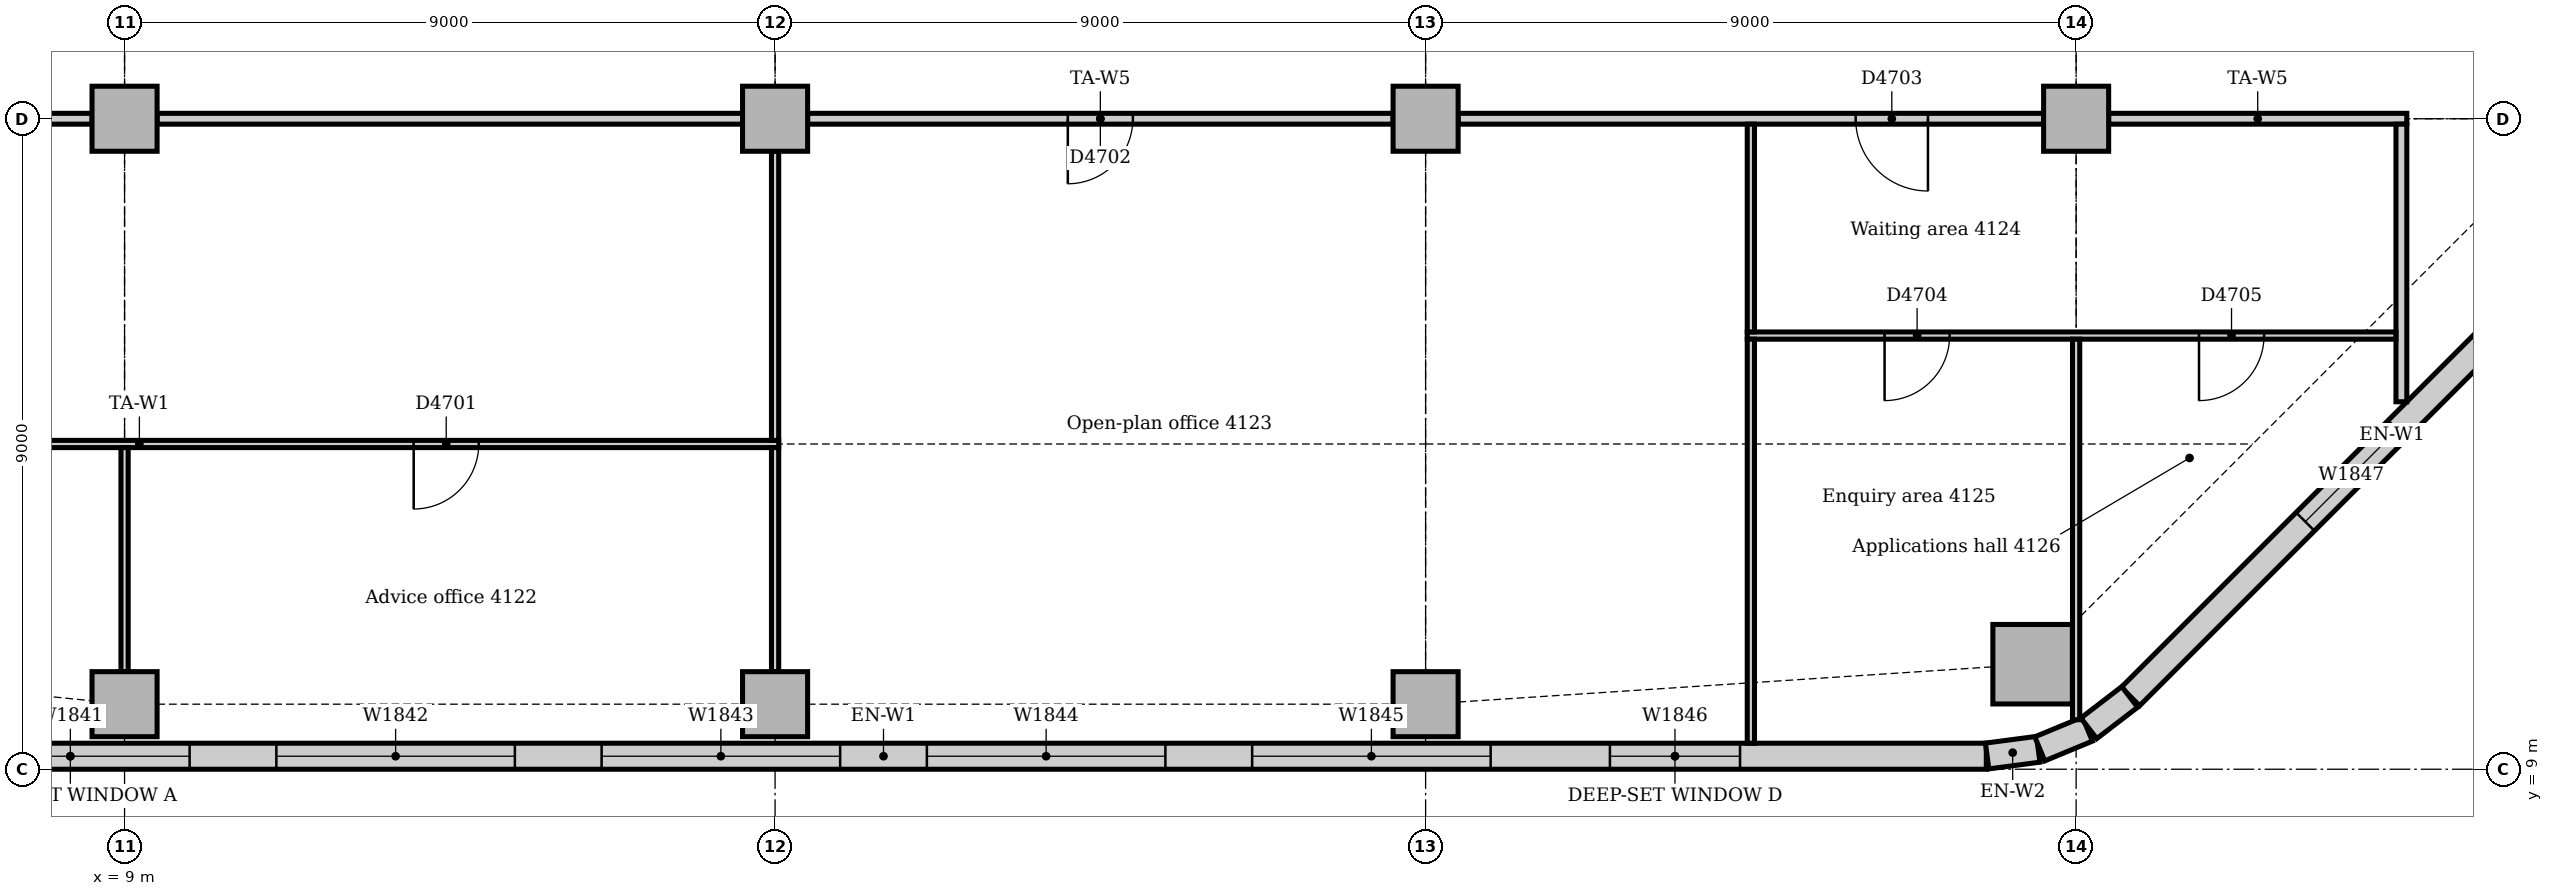
"""IFC4 building model, lengths in metres.
Left out: names, types, materials, properties, quantities, classifications, styles, units other than length and angle.
Written with IfcOpenShell. Run it as: python <this file> out.ifc"""

import sys

from ifc_helpers import new_model, si_unit, direction, frame, frame_2d, origin, origin_2d, place, context, subcontext, project, spatial, rectangle, extrude, element, fill, save


model = new_model("IFC4")
c1 = context("Model", 3, precision=1e-05, world=origin(), true_north=direction((0.0, 1.0)))
c2 = subcontext(c1, "Body", "Model", "MODEL_VIEW")
j1 = project(units=[si_unit("LENGTHUNIT", "METRE"), si_unit("PLANEANGLEUNIT", "RADIAN")], contexts=[c1])
p1 = place(None, origin())
s1 = spatial("IfcSite", under=j1, at=p1, CompositionType="ELEMENT")
p2 = place(p1, origin())
s2 = spatial("IfcBuilding", under=s1, at=p2, CompositionType="ELEMENT")
p3 = place(p2, frame((0.0, 0.0, 173.0)))
s3 = spatial("IfcBuildingStorey", under=s2, at=p3, CompositionType="ELEMENT", Elevation=173.0)
p4 = place(p3, frame((35.398, 10.453, 0.0), z_axis=(0.0, 0.0, 1.0), x_axis=(1.0, 0.0, 0.0)))
e1 = element("IfcColumn", 1, at=p4, inside=s3, PredefinedType="COLUMN", context=c2, shape_type="SweptSolid", body=[
    extrude(rectangle(XDim=1.1, YDim=1.1, at=origin_2d()), origin(), (0.0, 0.0, 1.0), 3.85),
])
for number, where, z_axis, x_axis in (
    (2, (9.0, 9.9, 0.0), (0.0, 0.0, 1.0), (1.0, 0.0, 0.0)),
    (3, (18.0, 9.9, 0.0), (0.0, 0.0, 1.0), (1.0, 0.0, 0.0)),
    (4, (27.0, 9.9, 0.0), (0.0, 0.0, 1.0), (1.0, 0.0, 0.0)),
    (5, (9.0, 18.0, 0.0), (0.0, 0.0, 1.0), (1.0, 0.0, 0.0)),
    (6, (18.0, 18.0, 0.0), (0.0, 0.0, 1.0), (1.0, 0.0, 0.0)),
    (7, (27.0, 18.0, 0.0), (0.0, 0.0, 1.0), (1.0, 0.0, 0.0)),
    (8, (36.0, 18.0, 0.0), (0.0, 0.0, 1.0), (1.0, 0.0, 0.0)),
):
    element("IfcColumn", number, at=place(p3, frame(where, z_axis=z_axis, x_axis=x_axis)), inside=s3, PredefinedType="COLUMN", context=c2, shape_type="SweptSolid", body=[
        extrude(rectangle(XDim=0.9, YDim=0.9, at=origin_2d()), origin(), (0.0, 0.0, 1.0), 3.85),
    ])
p5 = place(p3, frame((4.243, 9.18, 0.0), z_axis=(0.0, 0.0, 1.0), x_axis=(1.0, 0.0, 0.0)))
e9 = element("IfcWall", 9, at=p5, inside=s3, PredefinedType="STANDARD", context=c2, shape_type="SweptSolid", body=[
    extrude(rectangle(XDim=30.515, YDim=0.36, at=frame_2d((15.257, 0.0))), origin(), (0.0, 0.0, 1.0), 3.85),
])
p6 = place(p5, frame((2.357, 0.0, 0.9)))
e10 = element("IfcOpeningElement", 10, at=p6, cuts=e9, PredefinedType="OPENING", context=c2, shape_type="SweptSolid", body=[
    extrude(rectangle(XDim=3.3, YDim=1.6, at=frame_2d((1.65, 0.8))), frame((0.0, 0.19, 0.0), z_axis=(0.0, -1.0, 0.0), x_axis=(1.0, 0.0, 0.0)), (0.0, 0.0, 1.0), 0.38),
])
p7 = place(p5, frame((6.857, 0.0, 0.9)))
e11 = element("IfcOpeningElement", 11, at=p7, cuts=e9, PredefinedType="OPENING", context=c2, shape_type="SweptSolid", body=[
    extrude(rectangle(XDim=3.3, YDim=1.6, at=frame_2d((1.65, 0.8))), frame((0.0, 0.19, 0.0), z_axis=(0.0, -1.0, 0.0), x_axis=(1.0, 0.0, 0.0)), (0.0, 0.0, 1.0), 0.38),
])
p8 = place(p5, frame((11.357, 0.0, 0.9)))
e12 = element("IfcOpeningElement", 12, at=p8, cuts=e9, PredefinedType="OPENING", context=c2, shape_type="SweptSolid", body=[
    extrude(rectangle(XDim=3.3, YDim=1.6, at=frame_2d((1.65, 0.8))), frame((0.0, 0.19, 0.0), z_axis=(0.0, -1.0, 0.0), x_axis=(1.0, 0.0, 0.0)), (0.0, 0.0, 1.0), 0.38),
])
p9 = place(p5, frame((15.857, 0.0, 0.9)))
e13 = element("IfcOpeningElement", 13, at=p9, cuts=e9, PredefinedType="OPENING", context=c2, shape_type="SweptSolid", body=[
    extrude(rectangle(XDim=3.3, YDim=1.6, at=frame_2d((1.65, 0.8))), frame((0.0, 0.19, 0.0), z_axis=(0.0, -1.0, 0.0), x_axis=(1.0, 0.0, 0.0)), (0.0, 0.0, 1.0), 0.38),
])
p10 = place(p5, frame((20.357, 0.0, 0.9)))
e14 = element("IfcOpeningElement", 14, at=p10, cuts=e9, PredefinedType="OPENING", context=c2, shape_type="SweptSolid", body=[
    extrude(rectangle(XDim=3.3, YDim=1.6, at=frame_2d((1.65, 0.8))), frame((0.0, 0.19, 0.0), z_axis=(0.0, -1.0, 0.0), x_axis=(1.0, 0.0, 0.0)), (0.0, 0.0, 1.0), 0.38),
])
p11 = place(p5, frame((25.307, 0.0, 0.9)))
e15 = element("IfcOpeningElement", 15, at=p11, cuts=e9, PredefinedType="OPENING", context=c2, shape_type="SweptSolid", body=[
    extrude(rectangle(XDim=1.8, YDim=1.6, at=frame_2d((0.9, 0.8))), frame((0.0, 0.19, 0.0), z_axis=(0.0, -1.0, 0.0), x_axis=(1.0, 0.0, 0.0)), (0.0, 0.0, 1.0), 0.38),
])
p12 = place(p3, frame((36.751, 10.006, 0.0), z_axis=(0.0, 0.0, 1.0), x_axis=(0.707106781187, 0.707106781187, 0.0)))
e16 = element("IfcWall", 16, at=p12, inside=s3, PredefinedType="STANDARD", context=c2, shape_type="SweptSolid", body=[
    extrude(rectangle(XDim=10.243, YDim=0.36, at=frame_2d((5.121, 0.0))), origin(), (0.0, 0.0, 1.0), 3.85),
])
p13 = place(p12, frame((3.421, 0.0, 0.9)))
e17 = element("IfcOpeningElement", 17, at=p13, cuts=e16, PredefinedType="OPENING", context=c2, shape_type="SweptSolid", body=[
    extrude(rectangle(XDim=1.8, YDim=1.6, at=frame_2d((0.9, 0.8))), frame((0.0, 0.19, 0.0), z_axis=(0.0, -1.0, 0.0), x_axis=(1.0, 0.0, 0.0)), (0.0, 0.0, 1.0), 0.38),
])
for number, where, z_axis, x_axis in (
    (18, (34.769, 9.183, 0.0), (0.0, 0.0, 1.0), (0.991, 0.131, 0.0)),
    (19, (35.497, 9.282, 0.0), (0.0, 0.0, 1.0), (0.924, 0.383, 0.0)),
):
    element("IfcWall", number, at=place(p3, frame(where, z_axis=z_axis, x_axis=x_axis)), inside=s3, PredefinedType="STANDARD", context=c2, shape_type="SweptSolid", body=[
        extrude(rectangle(XDim=0.713, YDim=0.36, at=frame_2d((0.356, 0.0))), origin(), (0.0, 0.0, 1.0), 3.85),
    ])
p14 = place(p3, frame((36.175, 9.566, 0.0), z_axis=(0.0, 0.0, 1.0), x_axis=(0.793321924995, 0.608802368033, 0.0)))
e20 = element("IfcWall", 20, at=p14, inside=s3, PredefinedType="STANDARD", context=c2, shape_type="SweptSolid", body=[
    extrude(rectangle(XDim=0.713, YDim=0.36, at=frame_2d((0.357, 0.0))), origin(), (0.0, 0.0, 1.0), 3.85),
])
p15 = place(p3, frame((1.35, 18.0, 0.0), z_axis=(0.0, 0.0, 1.0), x_axis=(1.0, 0.0, 0.0)))
e21 = element("IfcWall", 21, at=p15, inside=s3, PredefinedType="PARTITIONING", context=c2, shape_type="SweptSolid", body=[
    extrude(rectangle(XDim=7.2, YDim=0.15, at=frame_2d((3.6, 0.0))), origin(), (0.0, 0.0, 1.0), 3.262),
])
p16 = place(p15, frame((3.1, 0.0, 0.0)))
e22 = element("IfcOpeningElement", 22, at=p16, cuts=e21, PredefinedType="OPENING", context=c2, shape_type="SweptSolid", body=[
    extrude(rectangle(XDim=1.0, YDim=2.1, at=frame_2d((0.5, 1.05))), frame((0.0, 0.085, 0.0), z_axis=(0.0, -1.0, 0.0), x_axis=(1.0, 0.0, 0.0)), (0.0, 0.0, 1.0), 0.17),
])
p17 = place(p3, frame((9.45, 18.0, 0.0), z_axis=(0.0, 0.0, 1.0), x_axis=(1.0, 0.0, 0.0)))
e23 = element("IfcWall", 23, at=p17, inside=s3, PredefinedType="PARTITIONING", context=c2, shape_type="SweptSolid", body=[
    extrude(rectangle(XDim=8.1, YDim=0.15, at=frame_2d((4.05, 0.0))), origin(), (0.0, 0.0, 1.0), 3.262),
])
p18 = place(p3, frame((18.45, 18.0, 0.0), z_axis=(0.0, 0.0, 1.0), x_axis=(1.0, 0.0, 0.0)))
e24 = element("IfcWall", 24, at=p18, inside=s3, PredefinedType="PARTITIONING", context=c2, shape_type="SweptSolid", body=[
    extrude(rectangle(XDim=8.1, YDim=0.15, at=frame_2d((4.05, 0.0))), origin(), (0.0, 0.0, 1.0), 3.262),
])
p19 = place(p18, frame((3.6, 0.0, 0.0)))
e25 = element("IfcOpeningElement", 25, at=p19, cuts=e24, PredefinedType="OPENING", context=c2, shape_type="SweptSolid", body=[
    extrude(rectangle(XDim=0.9, YDim=2.1, at=frame_2d((0.45, 1.05))), frame((0.0, 0.085, 0.0), z_axis=(0.0, -1.0, 0.0), x_axis=(1.0, 0.0, 0.0)), (0.0, 0.0, 1.0), 0.17),
])
p20 = place(p3, frame((27.45, 18.0, 0.0), z_axis=(0.0, 0.0, 1.0), x_axis=(1.0, 0.0, 0.0)))
e26 = element("IfcWall", 26, at=p20, inside=s3, PredefinedType="PARTITIONING", context=c2, shape_type="SweptSolid", body=[
    extrude(rectangle(XDim=8.1, YDim=0.15, at=frame_2d((4.05, 0.0))), origin(), (0.0, 0.0, 1.0), 3.262),
])
p21 = place(p20, frame((5.5, 0.0, 0.0)))
e27 = element("IfcOpeningElement", 27, at=p21, cuts=e26, PredefinedType="OPENING", context=c2, shape_type="SweptSolid", body=[
    extrude(rectangle(XDim=1.0, YDim=2.1, at=frame_2d((0.5, 1.05))), frame((0.0, 0.085, 0.0), z_axis=(0.0, -1.0, 0.0), x_axis=(1.0, 0.0, 0.0)), (0.0, 0.0, 1.0), 0.17),
])
p22 = place(p3, frame((36.45, 18.0, 0.0), z_axis=(0.0, 0.0, 1.0), x_axis=(1.0, 0.0, 0.0)))
e28 = element("IfcWall", 28, at=p22, inside=s3, PredefinedType="PARTITIONING", context=c2, shape_type="SweptSolid", body=[
    extrude(rectangle(XDim=4.125, YDim=0.15, at=frame_2d((2.062, 0.0))), origin(), (0.0, 0.0, 1.0), 3.35),
])
p23 = place(p3, frame((40.5, 14.084, 0.0), z_axis=(0.0, 0.0, 1.0), x_axis=(0.0, 1.0, 0.0)))
e29 = element("IfcWall", 29, at=p23, inside=s3, PredefinedType="PARTITIONING", context=c2, shape_type="SweptSolid", body=[
    extrude(rectangle(XDim=3.841, YDim=0.15, at=frame_2d((1.921, 0.0))), origin(), (0.0, 0.0, 1.0), 3.85),
])
p24 = place(p3, frame((0.36, 13.5, 0.0), z_axis=(0.0, 0.0, 1.0), x_axis=(1.0, 0.0, 0.0)))
e30 = element("IfcWall", 30, at=p24, inside=s3, PredefinedType="PARTITIONING", context=c2, shape_type="SweptSolid", body=[
    extrude(rectangle(XDim=17.69, YDim=0.1, at=frame_2d((8.845, 0.0))), origin(), (0.0, 0.0, 1.0), 3.4),
])
p25 = place(p24, frame((3.95, 0.0, 0.0)))
e31 = element("IfcOpeningElement", 31, at=p25, cuts=e30, PredefinedType="OPENING", context=c2, shape_type="SweptSolid", body=[
    extrude(rectangle(XDim=0.9, YDim=2.1, at=frame_2d((0.45, 1.05))), frame((0.0, 0.06, 0.0), z_axis=(0.0, -1.0, 0.0), x_axis=(1.0, 0.0, 0.0)), (0.0, 0.0, 1.0), 0.12),
])
p26 = place(p24, frame((12.64, 0.0, 0.0)))
e32 = element("IfcOpeningElement", 32, at=p26, cuts=e30, PredefinedType="OPENING", context=c2, shape_type="SweptSolid", body=[
    extrude(rectangle(XDim=0.9, YDim=2.1, at=frame_2d((0.45, 1.05))), frame((0.0, 0.06, 0.0), z_axis=(0.0, -1.0, 0.0), x_axis=(1.0, 0.0, 0.0)), (0.0, 0.0, 1.0), 0.12),
])
p27 = place(p3, frame((31.45, 15.0, 0.0), z_axis=(0.0, 0.0, 1.0), x_axis=(1.0, 0.0, 0.0)))
e33 = element("IfcWall", 33, at=p27, inside=s3, PredefinedType="PARTITIONING", context=c2, shape_type="SweptSolid", body=[
    extrude(rectangle(XDim=8.975, YDim=0.1, at=frame_2d((4.487, 0.0))), origin(), (0.0, 0.0, 1.0), 3.85),
])
p28 = place(p27, frame((1.9, 0.0, 0.0)))
e34 = element("IfcOpeningElement", 34, at=p28, cuts=e33, PredefinedType="OPENING", context=c2, shape_type="SweptSolid", body=[
    extrude(rectangle(XDim=0.9, YDim=2.1, at=frame_2d((0.45, 1.05))), frame((0.0, 0.06, 0.0), z_axis=(0.0, -1.0, 0.0), x_axis=(1.0, 0.0, 0.0)), (0.0, 0.0, 1.0), 0.12),
])
p29 = place(p27, frame((6.25, 0.0, 0.0)))
e35 = element("IfcOpeningElement", 35, at=p29, cuts=e33, PredefinedType="OPENING", context=c2, shape_type="SweptSolid", body=[
    extrude(rectangle(XDim=0.9, YDim=2.1, at=frame_2d((0.45, 1.05))), frame((0.0, 0.06, 0.0), z_axis=(0.0, -1.0, 0.0), x_axis=(1.0, 0.0, 0.0)), (0.0, 0.0, 1.0), 0.12),
])
p30 = place(p3, frame((18.0, 10.35, 0.0), z_axis=(0.0, 0.0, 1.0), x_axis=(0.0, 1.0, 0.0)))
e36 = element("IfcWall", 36, at=p30, inside=s3, PredefinedType="PARTITIONING", context=c2, shape_type="SweptSolid", body=[
    extrude(rectangle(XDim=3.1, YDim=0.1, at=frame_2d((1.55, 0.0))), origin(), (0.0, 0.0, 1.0), 3.362),
])
p31 = place(p3, frame((18.0, 13.55, 0.0), z_axis=(0.0, 0.0, 1.0), x_axis=(0.0, 1.0, 0.0)))
e37 = element("IfcWall", 37, at=p31, inside=s3, PredefinedType="PARTITIONING", context=c2, shape_type="SweptSolid", body=[
    extrude(rectangle(XDim=4.0, YDim=0.1, at=frame_2d((2.0, 0.0))), origin(), (0.0, 0.0, 1.0), 3.362),
])
p32 = place(p3, frame((31.5, 15.05, 0.0), z_axis=(0.0, 0.0, 1.0), x_axis=(0.0, 1.0, 0.0)))
e38 = element("IfcWall", 38, at=p32, inside=s3, PredefinedType="PARTITIONING", context=c2, shape_type="SweptSolid", body=[
    extrude(rectangle(XDim=2.875, YDim=0.1, at=frame_2d((1.438, 0.0))), origin(), (0.0, 0.0, 1.0), 3.85),
])
p33 = place(p3, frame((31.5, 9.36, 0.0), z_axis=(0.0, 0.0, 1.0), x_axis=(0.0, 1.0, 0.0)))
e39 = element("IfcWall", 39, at=p33, inside=s3, PredefinedType="PARTITIONING", context=c2, shape_type="SweptSolid", body=[
    extrude(rectangle(XDim=5.59, YDim=0.1, at=frame_2d((2.795, 0.0))), origin(), (0.0, 0.0, 1.0), 3.85),
])
p34 = place(p3, frame((36.0, 9.685, 0.0), z_axis=(0.0, 0.0, 1.0), x_axis=(0.0, 1.0, 0.0)))
e40 = element("IfcWall", 40, at=p34, inside=s3, PredefinedType="PARTITIONING", context=c2, shape_type="SweptSolid", body=[
    extrude(rectangle(XDim=5.265, YDim=0.1, at=frame_2d((2.632, 0.0))), origin(), (0.0, 0.0, 1.0), 3.35),
])
p35 = place(p3, frame((9.0, 10.35, 0.0), z_axis=(0.0, 0.0, 1.0), x_axis=(0.0, 1.0, 0.0)))
e41 = element("IfcWall", 41, at=p35, inside=s3, PredefinedType="PARTITIONING", context=c2, shape_type="SweptSolid", body=[
    extrude(rectangle(XDim=3.1, YDim=0.1, at=frame_2d((1.55, 0.0))), origin(), (0.0, 0.0, 1.0), 3.362),
])
p36 = place(p6, origin())
e42 = element("IfcWindow", 42, at=p36, inside=s3, PartitioningType="SINGLE_PANEL", PredefinedType="WINDOW", context=c2, shape_type="SweptSolid", body=[
    extrude(rectangle(XDim=3.3, YDim=1.6, at=frame_2d((1.65, 0.8))), frame((0.0, 0.13, 0.0), z_axis=(0.0, -1.0, 0.0), x_axis=(1.0, 0.0, 0.0)), (0.0, 0.0, 1.0), 0.06),
])
fill(e10, e42)
p37 = place(p7, origin())
e43 = element("IfcWindow", 43, at=p37, inside=s3, PartitioningType="SINGLE_PANEL", PredefinedType="WINDOW", context=c2, shape_type="SweptSolid", body=[
    extrude(rectangle(XDim=3.3, YDim=1.6, at=frame_2d((1.65, 0.8))), frame((0.0, 0.13, 0.0), z_axis=(0.0, -1.0, 0.0), x_axis=(1.0, 0.0, 0.0)), (0.0, 0.0, 1.0), 0.06),
])
fill(e11, e43)
p38 = place(p8, origin())
e44 = element("IfcWindow", 44, at=p38, inside=s3, PartitioningType="SINGLE_PANEL", PredefinedType="WINDOW", context=c2, shape_type="SweptSolid", body=[
    extrude(rectangle(XDim=3.3, YDim=1.6, at=frame_2d((1.65, 0.8))), frame((0.0, 0.13, 0.0), z_axis=(0.0, -1.0, 0.0), x_axis=(1.0, 0.0, 0.0)), (0.0, 0.0, 1.0), 0.06),
])
fill(e12, e44)
p39 = place(p9, origin())
e45 = element("IfcWindow", 45, at=p39, inside=s3, PartitioningType="SINGLE_PANEL", PredefinedType="WINDOW", context=c2, shape_type="SweptSolid", body=[
    extrude(rectangle(XDim=3.3, YDim=1.6, at=frame_2d((1.65, 0.8))), frame((0.0, 0.13, 0.0), z_axis=(0.0, -1.0, 0.0), x_axis=(1.0, 0.0, 0.0)), (0.0, 0.0, 1.0), 0.06),
])
fill(e13, e45)
p40 = place(p10, origin())
e46 = element("IfcWindow", 46, at=p40, inside=s3, PartitioningType="SINGLE_PANEL", PredefinedType="WINDOW", context=c2, shape_type="SweptSolid", body=[
    extrude(rectangle(XDim=3.3, YDim=1.6, at=frame_2d((1.65, 0.8))), frame((0.0, 0.13, 0.0), z_axis=(0.0, -1.0, 0.0), x_axis=(1.0, 0.0, 0.0)), (0.0, 0.0, 1.0), 0.06),
])
fill(e14, e46)
p41 = place(p11, origin())
e47 = element("IfcWindow", 47, at=p41, inside=s3, PartitioningType="SINGLE_PANEL", PredefinedType="WINDOW", context=c2, shape_type="SweptSolid", body=[
    extrude(rectangle(XDim=1.8, YDim=1.6, at=frame_2d((0.9, 0.8))), frame((0.0, 0.13, 0.0), z_axis=(0.0, -1.0, 0.0), x_axis=(1.0, 0.0, 0.0)), (0.0, 0.0, 1.0), 0.06),
])
fill(e15, e47)
p42 = place(p13, origin())
e48 = element("IfcWindow", 48, at=p42, inside=s3, PartitioningType="SINGLE_PANEL", PredefinedType="WINDOW", context=c2, shape_type="SweptSolid", body=[
    extrude(rectangle(XDim=1.8, YDim=1.6, at=frame_2d((0.9, 0.8))), frame((0.0, 0.13, 0.0), z_axis=(0.0, -1.0, 0.0), x_axis=(1.0, 0.0, 0.0)), (0.0, 0.0, 1.0), 0.06),
])
fill(e17, e48)
p43 = place(p26, frame((0.9, 0.0, 0.0), z_axis=(0.0, 0.0, 1.0), x_axis=(-1.0, 0.0, 0.0)))
e49 = element("IfcDoor", 49, at=p43, inside=s3, OperationType="SINGLE_SWING_RIGHT", PredefinedType="DOOR", context=c2, shape_type="SweptSolid", body=[
    extrude(rectangle(XDim=0.9, YDim=2.1, at=frame_2d((0.45, 1.05))), frame((0.0, 0.025, 0.0), z_axis=(0.0, -1.0, 0.0), x_axis=(1.0, 0.0, 0.0)), (0.0, 0.0, 1.0), 0.05),
])
fill(e32, e49)
p44 = place(p19, frame((0.9, 0.0, 0.0), z_axis=(0.0, 0.0, 1.0), x_axis=(-1.0, 0.0, 0.0)))
e50 = element("IfcDoor", 50, at=p44, inside=s3, OperationType="SINGLE_SWING_RIGHT", PredefinedType="DOOR", context=c2, shape_type="SweptSolid", body=[
    extrude(rectangle(XDim=0.9, YDim=2.1, at=frame_2d((0.45, 1.05))), frame((0.0, 0.025, 0.0), z_axis=(0.0, -1.0, 0.0), x_axis=(1.0, 0.0, 0.0)), (0.0, 0.0, 1.0), 0.05),
])
fill(e25, e50)
p45 = place(p21, frame((1.0, 0.0, 0.0), z_axis=(0.0, 0.0, 1.0), x_axis=(-1.0, 0.0, 0.0)))
e51 = element("IfcDoor", 51, at=p45, inside=s3, OperationType="SINGLE_SWING_LEFT", PredefinedType="DOOR", context=c2, shape_type="SweptSolid", body=[
    extrude(rectangle(XDim=1.0, YDim=2.1, at=frame_2d((0.5, 1.05))), frame((0.0, 0.025, 0.0), z_axis=(0.0, -1.0, 0.0), x_axis=(1.0, 0.0, 0.0)), (0.0, 0.0, 1.0), 0.05),
])
fill(e27, e51)
p46 = place(p28, frame((0.9, 0.0, 0.0), z_axis=(0.0, 0.0, 1.0), x_axis=(-1.0, 0.0, 0.0)))
e52 = element("IfcDoor", 52, at=p46, inside=s3, OperationType="SINGLE_SWING_RIGHT", PredefinedType="DOOR", context=c2, shape_type="SweptSolid", body=[
    extrude(rectangle(XDim=0.9, YDim=2.1, at=frame_2d((0.45, 1.05))), frame((0.0, 0.025, 0.0), z_axis=(0.0, -1.0, 0.0), x_axis=(1.0, 0.0, 0.0)), (0.0, 0.0, 1.0), 0.05),
])
fill(e34, e52)
p47 = place(p29, frame((0.9, 0.0, 0.0), z_axis=(0.0, 0.0, 1.0), x_axis=(-1.0, 0.0, 0.0)))
e53 = element("IfcDoor", 53, at=p47, inside=s3, OperationType="SINGLE_SWING_RIGHT", PredefinedType="DOOR", context=c2, shape_type="SweptSolid", body=[
    extrude(rectangle(XDim=0.9, YDim=2.1, at=frame_2d((0.45, 1.05))), frame((0.0, 0.025, 0.0), z_axis=(0.0, -1.0, 0.0), x_axis=(1.0, 0.0, 0.0)), (0.0, 0.0, 1.0), 0.05),
])
fill(e35, e53)
save(model, sys.argv[1])
